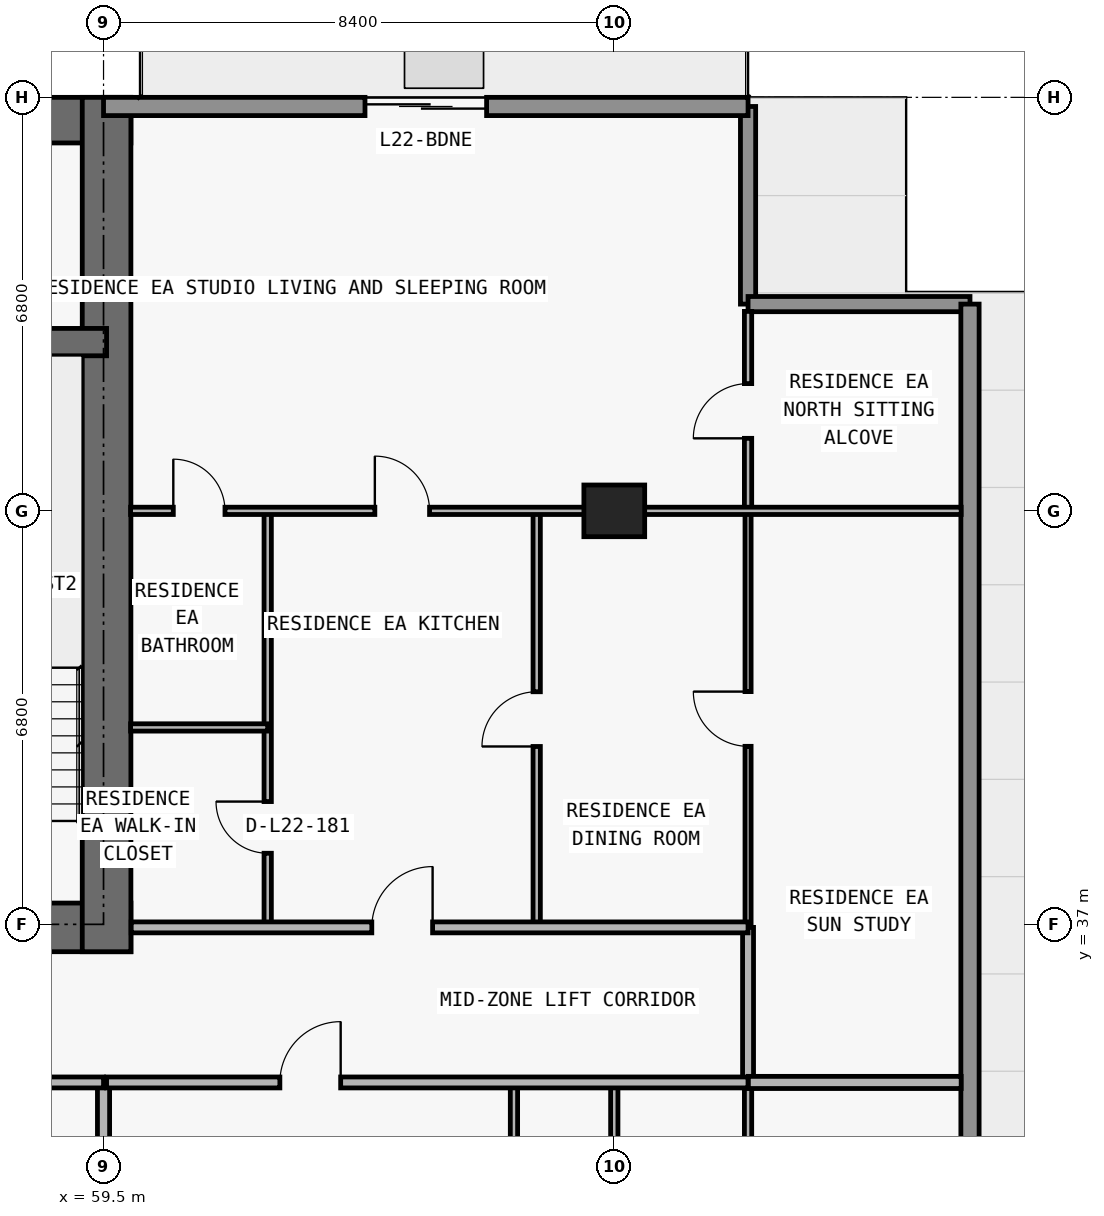
"""IFC4 building model, lengths in metres.
Left out: names, types, materials, properties, quantities, classifications, styles, units other than length and angle.
Written with IfcOpenShell. Run it as: python <this file> out.ifc"""

import sys

from ifc_helpers import new_model, si_unit, direction, frame, frame_2d, origin, origin_2d, place, context, subcontext, project, spatial, rectangle, extrude, element, fill, save


model = new_model("IFC4")
c1 = context("Model", 3, precision=1e-05, world=origin(), true_north=direction((0.0, 1.0)))
c2 = subcontext(c1, "Body", "Model", "MODEL_VIEW")
j1 = project(units=[si_unit("LENGTHUNIT", "METRE"), si_unit("PLANEANGLEUNIT", "RADIAN")], contexts=[c1])
p1 = place(None, origin())
s1 = spatial("IfcSite", under=j1, at=p1, CompositionType="ELEMENT")
p2 = place(p1, origin())
s2 = spatial("IfcBuilding", under=s1, at=p2, CompositionType="ELEMENT")
p3 = place(p2, frame((0.0, 0.0, 84.6)))
s3 = spatial("IfcBuildingStorey", under=s2, at=p3, CompositionType="ELEMENT", Elevation=84.6)
p4 = place(p3, frame((67.9, 43.8, 0.0), z_axis=(0.0, 0.0, 1.0), x_axis=(1.0, 0.0, 0.0)))
e1 = element("IfcColumn", 1, at=p4, inside=s3, PredefinedType="COLUMN", context=c2, shape_type="SweptSolid", body=[
    extrude(rectangle(XDim=1.0, YDim=0.85, at=origin_2d()), origin(), (0.0, 0.0, 1.0), 3.05),
])
p5 = place(p3, frame((17.85, 36.95, 0.0), z_axis=(0.0, 0.0, 1.0), x_axis=(1.0, 0.0, 0.0)))
e2 = element("IfcWall", 2, at=p5, inside=s3, PredefinedType="SHEAR", context=c2, shape_type="SweptSolid", body=[
    extrude(rectangle(XDim=42.1, YDim=0.8, at=frame_2d((21.05, 0.0))), origin(), (0.0, 0.0, 1.0), 3.05),
])
p6 = place(p5, frame((14.45, 0.0, 0.0)))
e3 = element("IfcOpeningElement", 3, at=p6, cuts=e2, PredefinedType="OPENING", context=c2, shape_type="SweptSolid", body=[
    extrude(rectangle(XDim=1.1, YDim=2.15, at=frame_2d((0.55, 1.075))), frame((0.0, 0.41, 0.0), z_axis=(0.0, -1.0, 0.0), x_axis=(1.0, 0.0, 0.0)), (0.0, 0.0, 1.0), 0.82),
])
p7 = place(p5, frame((6.3, 0.0, 0.0)))
e4 = element("IfcOpeningElement", 4, at=p7, cuts=e2, PredefinedType="OPENING", context=c2, shape_type="SweptSolid", body=[
    extrude(rectangle(XDim=1.05, YDim=2.15, at=frame_2d((0.525, 1.075))), frame((0.0, 0.41, 0.0), z_axis=(0.0, -1.0, 0.0), x_axis=(1.0, 0.0, 0.0)), (0.0, 0.0, 1.0), 0.82),
])
p8 = place(p5, frame((34.8, 0.0, 0.0)))
e5 = element("IfcOpeningElement", 5, at=p8, cuts=e2, PredefinedType="OPENING", context=c2, shape_type="SweptSolid", body=[
    extrude(rectangle(XDim=1.05, YDim=2.15, at=frame_2d((0.525, 1.075))), frame((0.0, 0.41, 0.0), z_axis=(0.0, -1.0, 0.0), x_axis=(1.0, 0.0, 0.0)), (0.0, 0.0, 1.0), 0.82),
])
p9 = place(p5, frame((10.913, 0.0, 0.0)))
e6 = element("IfcOpeningElement", 6, at=p9, cuts=e2, PredefinedType="OPENING", context=c2, shape_type="SweptSolid", body=[
    extrude(rectangle(XDim=1.05, YDim=2.15, at=frame_2d((0.525, 1.075))), frame((0.0, 0.41, 0.0), z_axis=(0.0, -1.0, 0.0), x_axis=(1.0, 0.0, 0.0)), (0.0, 0.0, 1.0), 0.82),
])
p10 = place(p5, frame((24.15, 0.0, 0.0)))
e7 = element("IfcOpeningElement", 7, at=p10, cuts=e2, PredefinedType="OPENING", context=c2, shape_type="SweptSolid", body=[
    extrude(rectangle(XDim=1.05, YDim=2.15, at=frame_2d((0.525, 1.075))), frame((0.0, 0.41, 0.0), z_axis=(0.0, -1.0, 0.0), x_axis=(1.0, 0.0, 0.0)), (0.0, 0.0, 1.0), 0.82),
])
p11 = place(p3, frame((17.85, 50.225, 0.0), z_axis=(0.0, 0.0, 1.0), x_axis=(1.0, 0.0, 0.0)))
e8 = element("IfcWall", 8, at=p11, inside=s3, PredefinedType="SHEAR", context=c2, shape_type="SweptSolid", body=[
    extrude(rectangle(XDim=42.1, YDim=0.75, at=frame_2d((21.05, 0.0))), origin(), (0.0, 0.0, 1.0), 3.05),
])
p12 = place(p3, frame((59.55, 36.55, 0.0), z_axis=(0.0, 0.0, 1.0), x_axis=(0.0, 1.0, 0.0)))
e9 = element("IfcWall", 9, at=p12, inside=s3, PredefinedType="SHEAR", context=c2, shape_type="SweptSolid", body=[
    extrude(rectangle(XDim=14.05, YDim=0.8, at=frame_2d((7.025, 0.0))), origin(), (0.0, 0.0, 1.0), 3.05),
])
p13 = place(p3, frame((18.25, 46.575, 0.0), z_axis=(0.0, 0.0, 1.0), x_axis=(1.0, 0.0, 0.0)))
e10 = element("IfcWall", 10, at=p13, inside=s3, PredefinedType="SHEAR", context=c2, shape_type="SweptSolid", body=[
    extrude(rectangle(XDim=41.3, YDim=0.45, at=frame_2d((20.65, 0.0))), origin(), (0.0, 0.0, 1.0), 3.05),
])
p14 = place(p13, frame((7.625, 0.0, 0.0)))
e11 = element("IfcOpeningElement", 11, at=p14, cuts=e10, PredefinedType="OPENING", context=c2, shape_type="SweptSolid", body=[
    extrude(rectangle(XDim=1.05, YDim=2.15, at=frame_2d((0.525, 1.075))), frame((0.0, 0.235, 0.0), z_axis=(0.0, -1.0, 0.0), x_axis=(1.0, 0.0, 0.0)), (0.0, 0.0, 1.0), 0.47),
])
p15 = place(p13, frame((32.675, 0.0, 0.0)))
e12 = element("IfcOpeningElement", 12, at=p15, cuts=e10, PredefinedType="OPENING", context=c2, shape_type="SweptSolid", body=[
    extrude(rectangle(XDim=1.05, YDim=2.15, at=frame_2d((0.525, 1.075))), frame((0.0, 0.235, 0.0), z_axis=(0.0, -1.0, 0.0), x_axis=(1.0, 0.0, 0.0)), (0.0, 0.0, 1.0), 0.47),
])
p16 = place(p3, frame((70.1, 50.45, 0.0), z_axis=(0.0, 0.0, 1.0), x_axis=(0.0, -1.0, 0.0)))
e13 = element("IfcWall", 13, at=p16, inside=s3, PredefinedType="ELEMENTEDWALL", context=c2, shape_type="SweptSolid", body=[
    extrude(rectangle(XDim=3.25, YDim=0.25, at=frame_2d((1.625, 0.0))), origin(), (0.0, 0.0, 1.0), 3.05),
])
p17 = place(p3, frame((70.1, 47.2, 0.0), z_axis=(0.0, 0.0, 1.0), x_axis=(1.0, 0.0, 0.0)))
e14 = element("IfcWall", 14, at=p17, inside=s3, PredefinedType="ELEMENTEDWALL", context=c2, shape_type="SweptSolid", body=[
    extrude(rectangle(XDim=3.65, YDim=0.25, at=frame_2d((1.825, 0.0))), origin(), (0.0, 0.0, 1.0), 3.05),
])
p18 = place(p3, frame((73.75, 47.2, 0.0), z_axis=(0.0, 0.0, 1.0), x_axis=(0.0, -1.0, 0.0)))
e15 = element("IfcWall", 15, at=p18, inside=s3, PredefinedType="STANDARD", context=c2, shape_type="SweptSolid", body=[
    extrude(rectangle(XDim=19.2, YDim=0.3, at=frame_2d((9.6, 0.0))), origin(), (0.0, 0.0, 1.0), 3.05),
])
p19 = place(p3, frame((59.5, 50.45, 0.0), z_axis=(0.0, 0.0, 1.0), x_axis=(1.0, 0.0, 0.0)))
e16 = element("IfcWall", 16, at=p19, inside=s3, PredefinedType="STANDARD", context=c2, shape_type="SweptSolid", body=[
    extrude(rectangle(XDim=10.6, YDim=0.3, at=frame_2d((5.3, 0.0))), origin(), (0.0, 0.0, 1.0), 3.05),
])
p20 = place(p19, frame((4.3, 0.0, 0.0)))
e17 = element("IfcOpeningElement", 17, at=p20, cuts=e16, PredefinedType="OPENING", context=c2, shape_type="SweptSolid", body=[
    extrude(rectangle(XDim=2.0, YDim=2.3, at=frame_2d((1.0, 1.15))), frame((0.0, 0.16, 0.0), z_axis=(0.0, -1.0, 0.0), x_axis=(1.0, 0.0, 0.0)), (0.0, 0.0, 1.0), 0.32),
])
p21 = place(p3, frame((59.5, 27.44, 0.0), z_axis=(0.0, 0.0, 1.0), x_axis=(0.0, 1.0, 0.0)))
e18 = element("IfcWall", 18, at=p21, inside=s3, PredefinedType="PARTITIONING", context=c2, shape_type="SweptSolid", body=[
    extrude(rectangle(XDim=6.96, YDim=0.2, at=frame_2d((3.48, 0.0))), origin(), (0.0, 0.0, 1.0), 2.174),
])
p22 = place(p3, frame((62.2, 36.95, 0.0), z_axis=(0.0, 0.0, 1.0), x_axis=(0.0, 1.0, 0.0)))
e19 = element("IfcWall", 19, at=p22, inside=s3, PredefinedType="PARTITIONING", context=c2, shape_type="SweptSolid", body=[
    extrude(rectangle(XDim=6.85, YDim=0.12, at=frame_2d((3.425, 0.0))), origin(), (0.0, 0.0, 1.0), 3.05),
])
p23 = place(p22, frame((1.219, 0.0, 0.0)))
e20 = element("IfcOpeningElement", 20, at=p23, cuts=e19, PredefinedType="OPENING", context=c2, shape_type="SweptSolid", body=[
    extrude(rectangle(XDim=0.85, YDim=2.1, at=frame_2d((0.425, 1.05))), frame((0.0, 0.07, 0.0), z_axis=(0.0, -1.0, 0.0), x_axis=(1.0, 0.0, 0.0)), (0.0, 0.0, 1.0), 0.14),
])
p24 = place(p3, frame((66.25, 27.44, 0.0), z_axis=(0.0, 0.0, 1.0), x_axis=(0.0, 1.0, 0.0)))
e21 = element("IfcWall", 21, at=p24, inside=s3, PredefinedType="PARTITIONING", context=c2, shape_type="SweptSolid", body=[
    extrude(rectangle(XDim=6.96, YDim=0.12, at=frame_2d((3.48, 0.0))), origin(), (0.0, 0.0, 1.0), 3.05),
])
p25 = place(p24, frame((3.055, 0.0, 0.0)))
e22 = element("IfcOpeningElement", 22, at=p25, cuts=e21, PredefinedType="OPENING", context=c2, shape_type="SweptSolid", body=[
    extrude(rectangle(XDim=0.85, YDim=2.1, at=frame_2d((0.425, 1.05))), frame((0.0, 0.07, 0.0), z_axis=(0.0, -1.0, 0.0), x_axis=(1.0, 0.0, 0.0)), (0.0, 0.0, 1.0), 0.14),
])
p26 = place(p3, frame((66.624, 36.95, 0.0), z_axis=(0.0, 0.0, 1.0), x_axis=(0.0, 1.0, 0.0)))
e23 = element("IfcWall", 23, at=p26, inside=s3, PredefinedType="PARTITIONING", context=c2, shape_type="SweptSolid", body=[
    extrude(rectangle(XDim=6.85, YDim=0.12, at=frame_2d((3.425, 0.0))), origin(), (0.0, 0.0, 1.0), 3.05),
])
p27 = place(p26, frame((2.975, 0.0, 0.0)))
e24 = element("IfcOpeningElement", 24, at=p27, cuts=e23, PredefinedType="OPENING", context=c2, shape_type="SweptSolid", body=[
    extrude(rectangle(XDim=0.9, YDim=2.15, at=frame_2d((0.45, 1.075))), frame((0.0, 0.07, 0.0), z_axis=(0.0, -1.0, 0.0), x_axis=(1.0, 0.0, 0.0)), (0.0, 0.0, 1.0), 0.14),
])
p28 = place(p3, frame((67.9, 27.44, 0.0), z_axis=(0.0, 0.0, 1.0), x_axis=(0.0, 1.0, 0.0)))
e25 = element("IfcWall", 25, at=p28, inside=s3, PredefinedType="PARTITIONING", context=c2, shape_type="SweptSolid", body=[
    extrude(rectangle(XDim=6.96, YDim=0.12, at=frame_2d((3.48, 0.0))), origin(), (0.0, 0.0, 1.0), 2.174),
])
p29 = place(p3, frame((70.1, 27.44, 0.0), z_axis=(0.0, 0.0, 1.0), x_axis=(0.0, 1.0, 0.0)))
e26 = element("IfcWall", 26, at=p29, inside=s3, PredefinedType="PARTITIONING", context=c2, shape_type="SweptSolid", body=[
    extrude(rectangle(XDim=6.96, YDim=0.12, at=frame_2d((3.48, 0.0))), origin(), (0.0, 0.0, 1.0), 3.05),
])
p30 = place(p3, frame((70.1, 34.405, 0.0), z_axis=(0.0, 0.0, 1.0), x_axis=(0.0, 1.0, 0.0)))
e27 = element("IfcWall", 27, at=p30, inside=s3, PredefinedType="PARTITIONING", context=c2, shape_type="SweptSolid", body=[
    extrude(rectangle(XDim=2.545, YDim=0.18, at=frame_2d((1.272, 0.0))), origin(), (0.0, 0.0, 1.0), 3.05),
])
p31 = place(p3, frame((70.1, 36.955, 0.0), z_axis=(0.0, 0.0, 1.0), x_axis=(0.0, 1.0, 0.0)))
e28 = element("IfcWall", 28, at=p31, inside=s3, PredefinedType="MOVABLE", context=c2, shape_type="SweptSolid", body=[
    extrude(rectangle(XDim=6.845, YDim=0.1, at=frame_2d((3.422, 0.0))), origin(), (0.0, 0.0, 1.0), 3.05),
])
p32 = place(p31, frame((2.972, 0.0, 0.0)))
e29 = element("IfcOpeningElement", 29, at=p32, cuts=e28, PredefinedType="OPENING", context=c2, shape_type="SweptSolid", body=[
    extrude(rectangle(XDim=0.9, YDim=2.15, at=frame_2d((0.45, 1.075))), frame((0.0, 0.06, 0.0), z_axis=(0.0, -1.0, 0.0), x_axis=(1.0, 0.0, 0.0)), (0.0, 0.0, 1.0), 0.12),
])
p33 = place(p3, frame((70.1, 43.805, 0.0), z_axis=(0.0, 0.0, 1.0), x_axis=(0.0, 1.0, 0.0)))
e30 = element("IfcWall", 30, at=p33, inside=s3, PredefinedType="PARTITIONING", context=c2, shape_type="SweptSolid", body=[
    extrude(rectangle(XDim=3.275, YDim=0.12, at=frame_2d((1.638, 0.0))), origin(), (0.0, 0.0, 1.0), 3.05),
])
p34 = place(p33, frame((1.188, 0.0, 0.0)))
e31 = element("IfcOpeningElement", 31, at=p34, cuts=e30, PredefinedType="OPENING", context=c2, shape_type="SweptSolid", body=[
    extrude(rectangle(XDim=0.9, YDim=2.15, at=frame_2d((0.45, 1.075))), frame((0.0, 0.07, 0.0), z_axis=(0.0, -1.0, 0.0), x_axis=(1.0, 0.0, 0.0)), (0.0, 0.0, 1.0), 0.14),
])
p35 = place(p3, frame((55.9, 34.4, 0.0), z_axis=(0.0, 0.0, 1.0), x_axis=(1.0, 0.0, 0.0)))
e32 = element("IfcWall", 32, at=p35, inside=s3, PredefinedType="PARTITIONING", context=c2, shape_type="SweptSolid", body=[
    extrude(rectangle(XDim=3.6, YDim=0.18, at=frame_2d((1.8, 0.0))), origin(), (0.0, 0.0, 1.0), 3.05),
])
p36 = place(p3, frame((59.55, 34.4, 0.0), z_axis=(0.0, 0.0, 1.0), x_axis=(1.0, 0.0, 0.0)))
e33 = element("IfcWall", 33, at=p36, inside=s3, PredefinedType="PARTITIONING", context=c2, shape_type="SweptSolid", body=[
    extrude(rectangle(XDim=10.55, YDim=0.18, at=frame_2d((5.275, 0.0))), origin(), (0.0, 0.0, 1.0), 3.05),
])
p37 = place(p36, frame((2.85, 0.0, 0.0)))
e34 = element("IfcOpeningElement", 34, at=p37, cuts=e33, PredefinedType="OPENING", context=c2, shape_type="SweptSolid", body=[
    extrude(rectangle(XDim=1.0, YDim=2.2, at=frame_2d((0.5, 1.1))), frame((0.0, 0.1, 0.0), z_axis=(0.0, -1.0, 0.0), x_axis=(1.0, 0.0, 0.0)), (0.0, 0.0, 1.0), 0.2),
])
p38 = place(p3, frame((70.105, 34.4, 0.0), z_axis=(0.0, 0.0, 1.0), x_axis=(1.0, 0.0, 0.0)))
e35 = element("IfcWall", 35, at=p38, inside=s3, PredefinedType="PARTITIONING", context=c2, shape_type="SweptSolid", body=[
    extrude(rectangle(XDim=3.5, YDim=0.2, at=frame_2d((1.75, 0.0))), origin(), (0.0, 0.0, 1.0), 3.05),
])
p39 = place(p3, frame((59.955, 36.95, 0.0), z_axis=(0.0, 0.0, 1.0), x_axis=(1.0, 0.0, 0.0)))
e36 = element("IfcWall", 36, at=p39, inside=s3, PredefinedType="PARTITIONING", context=c2, shape_type="SweptSolid", body=[
    extrude(rectangle(XDim=10.145, YDim=0.18, at=frame_2d((5.073, 0.0))), origin(), (0.0, 0.0, 1.0), 3.05),
])
p40 = place(p39, frame((3.957, 0.0, 0.0)))
e37 = element("IfcOpeningElement", 37, at=p40, cuts=e36, PredefinedType="OPENING", context=c2, shape_type="SweptSolid", body=[
    extrude(rectangle(XDim=1.0, YDim=2.2, at=frame_2d((0.5, 1.1))), frame((0.0, 0.1, 0.0), z_axis=(0.0, -1.0, 0.0), x_axis=(1.0, 0.0, 0.0)), (0.0, 0.0, 1.0), 0.2),
])
p41 = place(p3, frame((59.945, 40.238, 0.0), z_axis=(0.0, 0.0, 1.0), x_axis=(1.0, 0.0, 0.0)))
e38 = element("IfcWall", 38, at=p41, inside=s3, PredefinedType="PARTITIONING", context=c2, shape_type="SweptSolid", body=[
    extrude(rectangle(XDim=2.255, YDim=0.12, at=frame_2d((1.127, 0.0))), origin(), (0.0, 0.0, 1.0), 3.05),
])
p42 = place(p3, frame((59.945, 43.8, 0.0), z_axis=(0.0, 0.0, 1.0), x_axis=(1.0, 0.0, 0.0)))
e39 = element("IfcWall", 39, at=p42, inside=s3, PredefinedType="PARTITIONING", context=c2, shape_type="SweptSolid", body=[
    extrude(rectangle(XDim=13.66, YDim=0.12, at=frame_2d((6.83, 0.0))), origin(), (0.0, 0.0, 1.0), 2.339),
])
p43 = place(p42, frame((4.017, 0.0, 0.0)))
e40 = element("IfcOpeningElement", 40, at=p43, cuts=e39, PredefinedType="OPENING", context=c2, shape_type="SweptSolid", body=[
    extrude(rectangle(XDim=0.9, YDim=2.15, at=frame_2d((0.45, 1.075))), frame((0.0, 0.07, 0.0), z_axis=(0.0, -1.0, 0.0), x_axis=(1.0, 0.0, 0.0)), (0.0, 0.0, 1.0), 0.14),
])
p44 = place(p42, frame((0.702, 0.0, 0.0)))
e41 = element("IfcOpeningElement", 41, at=p44, cuts=e39, PredefinedType="OPENING", context=c2, shape_type="SweptSolid", body=[
    extrude(rectangle(XDim=0.85, YDim=2.1, at=frame_2d((0.425, 1.05))), frame((0.0, 0.07, 0.0), z_axis=(0.0, -1.0, 0.0), x_axis=(1.0, 0.0, 0.0)), (0.0, 0.0, 1.0), 0.14),
])
p45 = place(p20, origin())
e42 = element("IfcDoor", 42, at=p45, inside=s3, OperationType="DOUBLE_DOOR_SLIDING", PredefinedType="DOOR", context=c2, shape_type="SweptSolid", body=[
    extrude(rectangle(XDim=2.0, YDim=2.3, at=frame_2d((1.0, 1.15))), frame((0.0, 0.025, 0.0), z_axis=(0.0, -1.0, 0.0), x_axis=(1.0, 0.0, 0.0)), (0.0, 0.0, 1.0), 0.05),
])
fill(e17, e42)
p46 = place(p37, origin())
e43 = element("IfcDoor", 43, at=p46, inside=s3, OperationType="SINGLE_SWING_RIGHT", PredefinedType="DOOR", context=c2, shape_type="SweptSolid", body=[
    extrude(rectangle(XDim=1.0, YDim=2.2, at=frame_2d((0.5, 1.1))), frame((0.0, 0.025, 0.0), z_axis=(0.0, -1.0, 0.0), x_axis=(1.0, 0.0, 0.0)), (0.0, 0.0, 1.0), 0.05),
])
fill(e34, e43)
p47 = place(p27, origin())
e44 = element("IfcDoor", 44, at=p47, inside=s3, OperationType="SINGLE_SWING_LEFT", PredefinedType="DOOR", context=c2, shape_type="SweptSolid", body=[
    extrude(rectangle(XDim=0.9, YDim=2.15, at=frame_2d((0.45, 1.075))), frame((0.0, 0.025, 0.0), z_axis=(0.0, -1.0, 0.0), x_axis=(1.0, 0.0, 0.0)), (0.0, 0.0, 1.0), 0.05),
])
fill(e24, e44)
p48 = place(p40, origin())
e45 = element("IfcDoor", 45, at=p48, inside=s3, OperationType="SINGLE_SWING_RIGHT", PredefinedType="DOOR", context=c2, shape_type="SweptSolid", body=[
    extrude(rectangle(XDim=1.0, YDim=2.2, at=frame_2d((0.5, 1.1))), frame((0.0, 0.025, 0.0), z_axis=(0.0, -1.0, 0.0), x_axis=(1.0, 0.0, 0.0)), (0.0, 0.0, 1.0), 0.05),
])
fill(e37, e45)
p49 = place(p43, origin())
e46 = element("IfcDoor", 46, at=p49, inside=s3, OperationType="SINGLE_SWING_LEFT", PredefinedType="DOOR", context=c2, shape_type="SweptSolid", body=[
    extrude(rectangle(XDim=0.9, YDim=2.15, at=frame_2d((0.45, 1.075))), frame((0.0, 0.025, 0.0), z_axis=(0.0, -1.0, 0.0), x_axis=(1.0, 0.0, 0.0)), (0.0, 0.0, 1.0), 0.05),
])
fill(e40, e46)
p50 = place(p23, origin())
e47 = element("IfcDoor", 47, at=p50, inside=s3, OperationType="SINGLE_SWING_RIGHT", PredefinedType="DOOR", context=c2, shape_type="SweptSolid", body=[
    extrude(rectangle(XDim=0.85, YDim=2.1, at=frame_2d((0.425, 1.05))), frame((0.0, 0.025, 0.0), z_axis=(0.0, -1.0, 0.0), x_axis=(1.0, 0.0, 0.0)), (0.0, 0.0, 1.0), 0.05),
])
fill(e20, e47)
p51 = place(p44, origin())
e48 = element("IfcDoor", 48, at=p51, inside=s3, OperationType="SINGLE_SWING_LEFT", PredefinedType="DOOR", context=c2, shape_type="SweptSolid", body=[
    extrude(rectangle(XDim=0.85, YDim=2.1, at=frame_2d((0.425, 1.05))), frame((0.0, 0.025, 0.0), z_axis=(0.0, -1.0, 0.0), x_axis=(1.0, 0.0, 0.0)), (0.0, 0.0, 1.0), 0.05),
])
fill(e41, e48)
p52 = place(p32, origin())
e49 = element("IfcDoor", 49, at=p52, inside=s3, OperationType="SINGLE_SWING_RIGHT", PredefinedType="DOOR", context=c2, shape_type="SweptSolid", body=[
    extrude(rectangle(XDim=0.9, YDim=2.15, at=frame_2d((0.45, 1.075))), frame((0.0, 0.025, 0.0), z_axis=(0.0, -1.0, 0.0), x_axis=(1.0, 0.0, 0.0)), (0.0, 0.0, 1.0), 0.05),
])
fill(e29, e49)
p53 = place(p34, origin())
e50 = element("IfcDoor", 50, at=p53, inside=s3, OperationType="SINGLE_SWING_LEFT", PredefinedType="DOOR", context=c2, shape_type="SweptSolid", body=[
    extrude(rectangle(XDim=0.9, YDim=2.15, at=frame_2d((0.45, 1.075))), frame((0.0, 0.025, 0.0), z_axis=(0.0, -1.0, 0.0), x_axis=(1.0, 0.0, 0.0)), (0.0, 0.0, 1.0), 0.05),
])
fill(e31, e50)
save(model, sys.argv[1])
